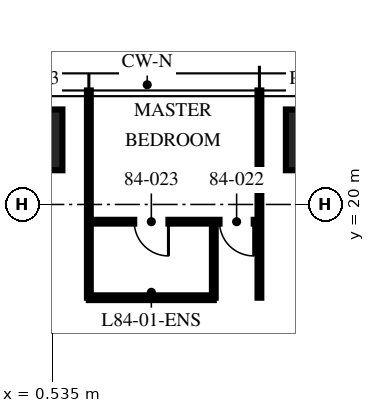
"""IFC4 building model, lengths in metres.
Left out: names, types, materials, properties, quantities, classifications, styles, units other than length and angle.
Written with IfcOpenShell. Run it as: python <this file> out.ifc"""

import sys

from ifc_helpers import new_model, si_unit, direction, frame, frame_2d, origin, origin_2d, place, context, subcontext, project, spatial, rectangle, extrude, element, fill, save


model = new_model("IFC4")
c1 = context("Model", 3, precision=1e-05, world=origin(), true_north=direction((0.0, 1.0)))
c2 = subcontext(c1, "Body", "Model", "MODEL_VIEW")
j1 = project(units=[si_unit("LENGTHUNIT", "METRE"), si_unit("PLANEANGLEUNIT", "RADIAN")], contexts=[c1])
p1 = place(None, origin())
s1 = spatial("IfcSite", under=j1, at=p1, CompositionType="ELEMENT")
p2 = place(p1, origin())
s2 = spatial("IfcBuilding", under=s1, at=p2, CompositionType="ELEMENT")
p3 = place(p2, frame((0.0, 0.0, 334.5)))
s3 = spatial("IfcBuildingStorey", under=s2, at=p3, CompositionType="ELEMENT", Elevation=334.5)
for number, where, z_axis, x_axis in (
    (1, (0.0, 21.7, 0.0), (0.0, 0.0, 1.0), (1.0, 0.0, 0.0)),
    (2, (7.48, 21.7, 0.0), (0.0, 0.0, 1.0), (1.0, 0.0, 0.0)),
):
    element("IfcColumn", number, at=place(p3, frame(where, z_axis=z_axis, x_axis=x_axis)), inside=s3, PredefinedType="COLUMN", context=c2, shape_type="SweptSolid", body=[
        extrude(rectangle(XDim=1.6, YDim=1.6, at=origin_2d()), origin(), (0.0, 0.0, 1.0), 3.75),
    ])
for number, where, z_axis, x_axis in (
    (3, (5.984, 17.546, 0.0), (0.0, 0.0, 1.0), (0.0, 1.0, 0.0)),
    (4, (1.496, 17.546, 0.0), (0.0, 0.0, 1.0), (0.0, 1.0, 0.0)),
):
    element("IfcWall", number, at=place(p3, frame(where, z_axis=z_axis, x_axis=x_axis)), inside=s3, PredefinedType="PARTITIONING", context=c2, shape_type="SweptSolid", body=[
        extrude(rectangle(XDim=5.454, YDim=0.1, at=frame_2d((2.727, 0.0))), origin(), (0.0, 0.0, 1.0), 3.01),
    ])
p4 = place(p3, frame((5.984, 19.546, 0.0), z_axis=(0.0, 0.0, 1.0), x_axis=(-1.0, 0.0, 0.0)))
e5 = element("IfcWall", 5, at=p4, inside=s3, PredefinedType="PARTITIONING", context=c2, shape_type="SweptSolid", body=[
    extrude(rectangle(XDim=4.488, YDim=0.1, at=frame_2d((2.244, 0.0))), origin(), (0.0, 0.0, 1.0), 2.91),
])
p5 = place(p4, frame((0.15, 0.0, 0.0)))
e6 = element("IfcOpeningElement", 6, at=p5, cuts=e5, PredefinedType="OPENING", context=c2, shape_type="SweptSolid", body=[
    extrude(rectangle(XDim=0.9, YDim=2.1, at=frame_2d((0.45, 1.05))), frame((0.0, 0.06, 0.0), z_axis=(0.0, -1.0, 0.0), x_axis=(1.0, 0.0, 0.0)), (0.0, 0.0, 1.0), 0.12),
])
p6 = place(p4, frame((2.394, 0.0, 0.0)))
e7 = element("IfcOpeningElement", 7, at=p6, cuts=e5, PredefinedType="OPENING", context=c2, shape_type="SweptSolid", body=[
    extrude(rectangle(XDim=0.9, YDim=2.1, at=frame_2d((0.45, 1.05))), frame((0.0, 0.06, 0.0), z_axis=(0.0, -1.0, 0.0), x_axis=(1.0, 0.0, 0.0)), (0.0, 0.0, 1.0), 0.12),
])
p7 = place(p3, frame((4.784, 17.546, 0.0), z_axis=(0.0, 0.0, 1.0), x_axis=(0.0, 1.0, 0.0)))
e8 = element("IfcWall", 8, at=p7, inside=s3, PredefinedType="PARTITIONING", context=c2, shape_type="SweptSolid", body=[
    extrude(rectangle(XDim=2.0, YDim=0.1, at=frame_2d((1.0, 0.0))), origin(), (0.0, 0.0, 1.0), 3.5),
])
p8 = place(p3, frame((4.784, 17.546, 0.0), z_axis=(0.0, 0.0, 1.0), x_axis=(-1.0, 0.0, 0.0)))
e9 = element("IfcWall", 9, at=p8, inside=s3, PredefinedType="PARTITIONING", context=c2, shape_type="SweptSolid", body=[
    extrude(rectangle(XDim=3.288, YDim=0.125, at=frame_2d((1.644, 0.0))), origin(), (0.0, 0.0, 1.0), 2.91),
])
p9 = place(p5, origin())
e10 = element("IfcDoor", 10, at=p9, inside=s3, OperationType="SINGLE_SWING_LEFT", PredefinedType="DOOR", context=c2, shape_type="SweptSolid", body=[
    extrude(rectangle(XDim=0.9, YDim=2.1, at=frame_2d((0.45, 1.05))), frame((0.0, 0.025, 0.0), z_axis=(0.0, -1.0, 0.0), x_axis=(1.0, 0.0, 0.0)), (0.0, 0.0, 1.0), 0.05),
])
fill(e6, e10)
p10 = place(p6, origin())
e11 = element("IfcDoor", 11, at=p10, inside=s3, OperationType="SINGLE_SWING_LEFT", PredefinedType="DOOR", context=c2, shape_type="SweptSolid", body=[
    extrude(rectangle(XDim=0.9, YDim=2.1, at=frame_2d((0.45, 1.05))), frame((0.0, 0.025, 0.0), z_axis=(0.0, -1.0, 0.0), x_axis=(1.0, 0.0, 0.0)), (0.0, 0.0, 1.0), 0.05),
])
fill(e7, e11)
save(model, sys.argv[1])
